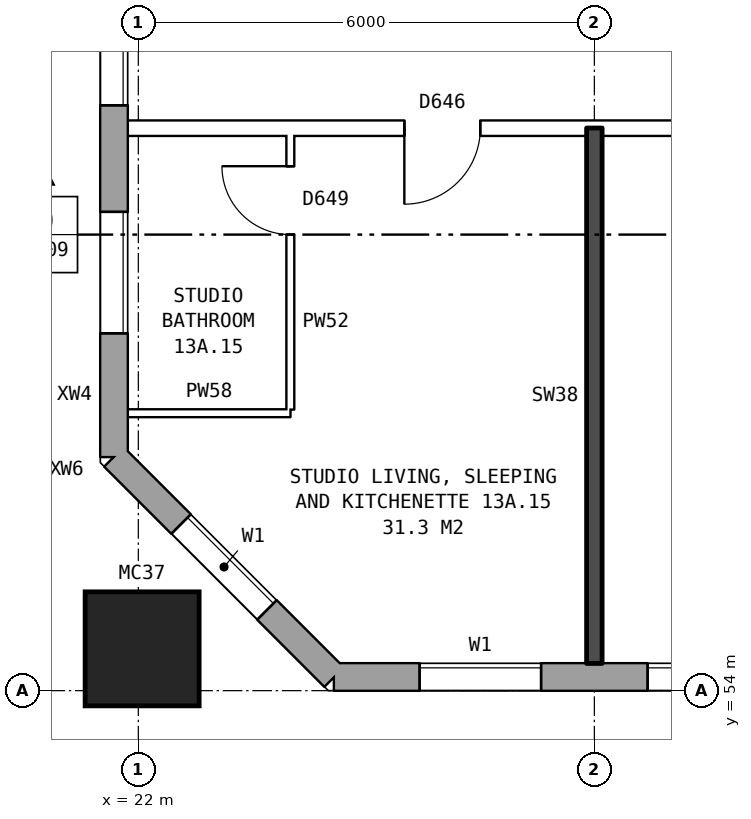
"""IFC4 building model, lengths in metres.
Left out: names, types, materials, properties, quantities, classifications, styles, units other than length and angle.
Written with IfcOpenShell. Run it as: python <this file> out.ifc"""

import sys

from ifc_helpers import new_model, si_unit, direction, frame, frame_2d, origin, origin_2d, place, context, subcontext, project, spatial, rectangle, hollow_rectangle, extrude, element, fill, save


model = new_model("IFC4")
c1 = context("Model", 3, precision=1e-05, world=origin(), true_north=direction((0.0, 1.0)))
c2 = subcontext(c1, "Body", "Model", "MODEL_VIEW")
j1 = project(units=[si_unit("LENGTHUNIT", "METRE"), si_unit("PLANEANGLEUNIT", "RADIAN")], contexts=[c1])
p1 = place(None, origin())
s1 = spatial("IfcSite", under=j1, at=p1, CompositionType="ELEMENT")
p2 = place(p1, origin())
s2 = spatial("IfcBuilding", under=s1, at=p2, CompositionType="ELEMENT")
p3 = place(p2, frame((0.0, 0.0, 50.5)))
s3 = spatial("IfcBuildingStorey", under=s2, at=p3, CompositionType="ELEMENT", Elevation=50.5)
p4 = place(p3, frame((22.05, 54.55, 0.0), z_axis=(0.0, 0.0, 1.0), x_axis=(1.0, 0.0, 0.0)))
e1 = element("IfcColumn", 1, at=p4, inside=s3, PredefinedType="COLUMN", context=c2, shape_type="SweptSolid", body=[
    extrude(hollow_rectangle(XDim=1.5, YDim=1.5, WallThickness=0.08, at=origin_2d()), origin(), (0.0, 0.0, 1.0), 3.1),
])
p5 = place(p3, frame((21.68, 57.075, 0.0), z_axis=(0.0, 0.0, 1.0), x_axis=(0.707106781187, -0.707106781187, 0.0)))
e2 = element("IfcWall", 2, at=p5, inside=s3, PredefinedType="STANDARD", context=c2, shape_type="SweptSolid", body=[
    extrude(rectangle(XDim=4.094, YDim=0.36, at=frame_2d((2.047, 0.0))), origin(), (0.0, 0.0, 1.0), 2.85),
])
p6 = place(p5, frame((1.247, 0.0, 0.8)))
e3 = element("IfcOpeningElement", 3, at=p6, cuts=e2, PredefinedType="OPENING", context=c2, shape_type="SweptSolid", body=[
    extrude(rectangle(XDim=1.6, YDim=1.8, at=frame_2d((0.8, 0.9))), frame((0.0, 0.19, 0.0), z_axis=(0.0, -1.0, 0.0), x_axis=(1.0, 0.0, 0.0)), (0.0, 0.0, 1.0), 0.38),
])
p7 = place(p3, frame((24.575, 54.18, 0.0), z_axis=(0.0, 0.0, 1.0), x_axis=(1.0, 0.0, 0.0)))
e4 = element("IfcWall", 4, at=p7, inside=s3, PredefinedType="STANDARD", context=c2, shape_type="SweptSolid", body=[
    extrude(rectangle(XDim=48.351, YDim=0.36, at=frame_2d((24.175, 0.0))), origin(), (0.0, 0.0, 1.0), 2.85),
])
p8 = place(p7, frame((1.125, 0.0, 0.8)))
e5 = element("IfcOpeningElement", 5, at=p8, cuts=e4, PredefinedType="OPENING", context=c2, shape_type="SweptSolid", body=[
    extrude(rectangle(XDim=1.6, YDim=1.8, at=frame_2d((0.8, 0.9))), frame((0.0, 0.19, 0.0), z_axis=(0.0, -1.0, 0.0), x_axis=(1.0, 0.0, 0.0)), (0.0, 0.0, 1.0), 0.38),
])
p9 = place(p7, frame((4.125, 0.0, 0.8)))
e6 = element("IfcOpeningElement", 6, at=p9, cuts=e4, PredefinedType="OPENING", context=c2, shape_type="SweptSolid", body=[
    extrude(rectangle(XDim=1.6, YDim=1.8, at=frame_2d((0.8, 0.9))), frame((0.0, 0.19, 0.0), z_axis=(0.0, -1.0, 0.0), x_axis=(1.0, 0.0, 0.0)), (0.0, 0.0, 1.0), 0.38),
])
p10 = place(p7, frame((6.025, 0.0, 0.8)))
e7 = element("IfcOpeningElement", 7, at=p10, cuts=e4, PredefinedType="OPENING", context=c2, shape_type="SweptSolid", body=[
    extrude(rectangle(XDim=1.0, YDim=1.8, at=frame_2d((0.5, 0.9))), frame((0.0, 0.19, 0.0), z_axis=(0.0, -1.0, 0.0), x_axis=(1.0, 0.0, 0.0)), (0.0, 0.0, 1.0), 0.38),
])
p11 = place(p7, frame((9.775, 0.0, 0.8)))
e8 = element("IfcOpeningElement", 8, at=p11, cuts=e4, PredefinedType="OPENING", context=c2, shape_type="SweptSolid", body=[
    extrude(rectangle(XDim=1.0, YDim=0.9, at=frame_2d((0.5, 0.45))), frame((0.0, 0.19, 0.0), z_axis=(0.0, -1.0, 0.0), x_axis=(1.0, 0.0, 0.0)), (0.0, 0.0, 1.0), 0.38),
])
p12 = place(p7, frame((13.125, 0.0, 0.8)))
e9 = element("IfcOpeningElement", 9, at=p12, cuts=e4, PredefinedType="OPENING", context=c2, shape_type="SweptSolid", body=[
    extrude(rectangle(XDim=1.6, YDim=1.8, at=frame_2d((0.8, 0.9))), frame((0.0, 0.19, 0.0), z_axis=(0.0, -1.0, 0.0), x_axis=(1.0, 0.0, 0.0)), (0.0, 0.0, 1.0), 0.38),
])
p13 = place(p7, frame((16.125, 0.0, 0.8)))
e10 = element("IfcOpeningElement", 10, at=p13, cuts=e4, PredefinedType="OPENING", context=c2, shape_type="SweptSolid", body=[
    extrude(rectangle(XDim=1.6, YDim=1.8, at=frame_2d((0.8, 0.9))), frame((0.0, 0.19, 0.0), z_axis=(0.0, -1.0, 0.0), x_axis=(1.0, 0.0, 0.0)), (0.0, 0.0, 1.0), 0.38),
])
p14 = place(p7, frame((19.125, 0.0, 0.8)))
e11 = element("IfcOpeningElement", 11, at=p14, cuts=e4, PredefinedType="OPENING", context=c2, shape_type="SweptSolid", body=[
    extrude(rectangle(XDim=1.6, YDim=1.8, at=frame_2d((0.8, 0.9))), frame((0.0, 0.19, 0.0), z_axis=(0.0, -1.0, 0.0), x_axis=(1.0, 0.0, 0.0)), (0.0, 0.0, 1.0), 0.38),
])
p15 = place(p7, frame((22.125, 0.0, 0.8)))
e12 = element("IfcOpeningElement", 12, at=p15, cuts=e4, PredefinedType="OPENING", context=c2, shape_type="SweptSolid", body=[
    extrude(rectangle(XDim=1.6, YDim=1.8, at=frame_2d((0.8, 0.9))), frame((0.0, 0.19, 0.0), z_axis=(0.0, -1.0, 0.0), x_axis=(1.0, 0.0, 0.0)), (0.0, 0.0, 1.0), 0.38),
])
p16 = place(p7, frame((25.125, 0.0, 0.8)))
e13 = element("IfcOpeningElement", 13, at=p16, cuts=e4, PredefinedType="OPENING", context=c2, shape_type="SweptSolid", body=[
    extrude(rectangle(XDim=1.6, YDim=1.8, at=frame_2d((0.8, 0.9))), frame((0.0, 0.19, 0.0), z_axis=(0.0, -1.0, 0.0), x_axis=(1.0, 0.0, 0.0)), (0.0, 0.0, 1.0), 0.38),
])
p17 = place(p7, frame((28.125, 0.0, 0.8)))
e14 = element("IfcOpeningElement", 14, at=p17, cuts=e4, PredefinedType="OPENING", context=c2, shape_type="SweptSolid", body=[
    extrude(rectangle(XDim=1.6, YDim=1.8, at=frame_2d((0.8, 0.9))), frame((0.0, 0.19, 0.0), z_axis=(0.0, -1.0, 0.0), x_axis=(1.0, 0.0, 0.0)), (0.0, 0.0, 1.0), 0.38),
])
p18 = place(p7, frame((31.125, 0.0, 0.8)))
e15 = element("IfcOpeningElement", 15, at=p18, cuts=e4, PredefinedType="OPENING", context=c2, shape_type="SweptSolid", body=[
    extrude(rectangle(XDim=1.6, YDim=1.8, at=frame_2d((0.8, 0.9))), frame((0.0, 0.19, 0.0), z_axis=(0.0, -1.0, 0.0), x_axis=(1.0, 0.0, 0.0)), (0.0, 0.0, 1.0), 0.38),
])
p19 = place(p7, frame((34.125, 0.0, 0.8)))
e16 = element("IfcOpeningElement", 16, at=p19, cuts=e4, PredefinedType="OPENING", context=c2, shape_type="SweptSolid", body=[
    extrude(rectangle(XDim=1.6, YDim=1.8, at=frame_2d((0.8, 0.9))), frame((0.0, 0.19, 0.0), z_axis=(0.0, -1.0, 0.0), x_axis=(1.0, 0.0, 0.0)), (0.0, 0.0, 1.0), 0.38),
])
p20 = place(p7, frame((36.575, 0.0, 0.45)))
e17 = element("IfcOpeningElement", 17, at=p20, cuts=e4, PredefinedType="OPENING", context=c2, shape_type="SweptSolid", body=[
    extrude(rectangle(XDim=1.2, YDim=1.8, at=frame_2d((0.6, 0.9))), frame((0.0, 0.19, 0.0), z_axis=(0.0, -1.0, 0.0), x_axis=(1.0, 0.0, 0.0)), (0.0, 0.0, 1.0), 0.38),
])
p21 = place(p7, frame((39.975, 0.0, 1.7)))
e18 = element("IfcOpeningElement", 18, at=p21, cuts=e4, PredefinedType="OPENING", context=c2, shape_type="SweptSolid", body=[
    extrude(rectangle(XDim=1.0, YDim=0.9, at=frame_2d((0.5, 0.45))), frame((0.0, 0.19, 0.0), z_axis=(0.0, -1.0, 0.0), x_axis=(1.0, 0.0, 0.0)), (0.0, 0.0, 1.0), 0.38),
])
p22 = place(p7, frame((43.125, 0.0, 0.8)))
e19 = element("IfcOpeningElement", 19, at=p22, cuts=e4, PredefinedType="OPENING", context=c2, shape_type="SweptSolid", body=[
    extrude(rectangle(XDim=1.6, YDim=1.8, at=frame_2d((0.8, 0.9))), frame((0.0, 0.19, 0.0), z_axis=(0.0, -1.0, 0.0), x_axis=(1.0, 0.0, 0.0)), (0.0, 0.0, 1.0), 0.38),
])
p23 = place(p7, frame((46.125, 0.0, 0.8)))
e20 = element("IfcOpeningElement", 20, at=p23, cuts=e4, PredefinedType="OPENING", context=c2, shape_type="SweptSolid", body=[
    extrude(rectangle(XDim=1.6, YDim=1.8, at=frame_2d((0.8, 0.9))), frame((0.0, 0.19, 0.0), z_axis=(0.0, -1.0, 0.0), x_axis=(1.0, 0.0, 0.0)), (0.0, 0.0, 1.0), 0.38),
])
p24 = place(p7, frame((7.325, 0.0, 1.7)))
e21 = element("IfcOpeningElement", 21, at=p24, cuts=e4, PredefinedType="OPENING", context=c2, shape_type="SweptSolid", body=[
    extrude(rectangle(XDim=1.0, YDim=0.9, at=frame_2d((0.5, 0.45))), frame((0.0, 0.19, 0.0), z_axis=(0.0, -1.0, 0.0), x_axis=(1.0, 0.0, 0.0)), (0.0, 0.0, 1.0), 0.38),
])
p25 = place(p7, frame((11.075, 0.0, 0.8)))
e22 = element("IfcOpeningElement", 22, at=p25, cuts=e4, PredefinedType="OPENING", context=c2, shape_type="SweptSolid", body=[
    extrude(rectangle(XDim=1.0, YDim=1.8, at=frame_2d((0.5, 0.9))), frame((0.0, 0.19, 0.0), z_axis=(0.0, -1.0, 0.0), x_axis=(1.0, 0.0, 0.0)), (0.0, 0.0, 1.0), 0.38),
])
p26 = place(p7, frame((38.075, 0.0, 0.45)))
e23 = element("IfcOpeningElement", 23, at=p26, cuts=e4, PredefinedType="OPENING", context=c2, shape_type="SweptSolid", body=[
    extrude(rectangle(XDim=1.0, YDim=0.9, at=frame_2d((0.5, 0.45))), frame((0.0, 0.19, 0.0), z_axis=(0.0, -1.0, 0.0), x_axis=(1.0, 0.0, 0.0)), (0.0, 0.0, 1.0), 0.38),
])
p27 = place(p7, frame((41.275, 0.0, 0.8)))
e24 = element("IfcOpeningElement", 24, at=p27, cuts=e4, PredefinedType="OPENING", context=c2, shape_type="SweptSolid", body=[
    extrude(rectangle(XDim=1.4, YDim=1.8, at=frame_2d((0.7, 0.9))), frame((0.0, 0.19, 0.0), z_axis=(0.0, -1.0, 0.0), x_axis=(1.0, 0.0, 0.0)), (0.0, 0.0, 1.0), 0.38),
])
p28 = place(p3, frame((21.68, 82.925, 0.0), z_axis=(0.0, 0.0, 1.0), x_axis=(0.0, -1.0, 0.0)))
e25 = element("IfcWall", 25, at=p28, inside=s3, PredefinedType="STANDARD", context=c2, shape_type="SweptSolid", body=[
    extrude(rectangle(XDim=25.851, YDim=0.36, at=frame_2d((12.925, 0.0))), origin(), (0.0, 0.0, 1.0), 2.85),
])
p29 = place(p28, frame((1.625, 0.0, 0.8)))
e26 = element("IfcOpeningElement", 26, at=p29, cuts=e25, PredefinedType="OPENING", context=c2, shape_type="SweptSolid", body=[
    extrude(rectangle(XDim=1.6, YDim=1.8, at=frame_2d((0.8, 0.9))), frame((0.0, 0.19, 0.0), z_axis=(0.0, -1.0, 0.0), x_axis=(1.0, 0.0, 0.0)), (0.0, 0.0, 1.0), 0.38),
])
p30 = place(p28, frame((4.625, 0.0, 0.8)))
e27 = element("IfcOpeningElement", 27, at=p30, cuts=e25, PredefinedType="OPENING", context=c2, shape_type="SweptSolid", body=[
    extrude(rectangle(XDim=1.6, YDim=1.8, at=frame_2d((0.8, 0.9))), frame((0.0, 0.19, 0.0), z_axis=(0.0, -1.0, 0.0), x_axis=(1.0, 0.0, 0.0)), (0.0, 0.0, 1.0), 0.38),
])
p31 = place(p28, frame((6.525, 0.0, 0.8)))
e28 = element("IfcOpeningElement", 28, at=p31, cuts=e25, PredefinedType="OPENING", context=c2, shape_type="SweptSolid", body=[
    extrude(rectangle(XDim=1.6, YDim=1.8, at=frame_2d((0.8, 0.9))), frame((0.0, 0.19, 0.0), z_axis=(0.0, -1.0, 0.0), x_axis=(1.0, 0.0, 0.0)), (0.0, 0.0, 1.0), 0.38),
])
p32 = place(p28, frame((8.425, 0.0, 1.1)))
e29 = element("IfcOpeningElement", 29, at=p32, cuts=e25, PredefinedType="OPENING", context=c2, shape_type="SweptSolid", body=[
    extrude(rectangle(XDim=0.8, YDim=1.5, at=frame_2d((0.4, 0.75))), frame((0.0, 0.19, 0.0), z_axis=(0.0, -1.0, 0.0), x_axis=(1.0, 0.0, 0.0)), (0.0, 0.0, 1.0), 0.38),
])
p33 = place(p28, frame((9.525, 0.0, 1.6)))
e30 = element("IfcOpeningElement", 30, at=p33, cuts=e25, PredefinedType="OPENING", context=c2, shape_type="SweptSolid", body=[
    extrude(rectangle(XDim=0.6, YDim=0.9, at=frame_2d((0.3, 0.45))), frame((0.0, 0.19, 0.0), z_axis=(0.0, -1.0, 0.0), x_axis=(1.0, 0.0, 0.0)), (0.0, 0.0, 1.0), 0.38),
])
p34 = place(p28, frame((11.475, 0.0, 0.8)))
e31 = element("IfcOpeningElement", 31, at=p34, cuts=e25, PredefinedType="OPENING", context=c2, shape_type="SweptSolid", body=[
    extrude(rectangle(XDim=0.6, YDim=0.9, at=frame_2d((0.3, 0.45))), frame((0.0, 0.19, 0.0), z_axis=(0.0, -1.0, 0.0), x_axis=(1.0, 0.0, 0.0)), (0.0, 0.0, 1.0), 0.38),
])
p35 = place(p28, frame((19.625, 0.0, 0.8)))
e32 = element("IfcOpeningElement", 32, at=p35, cuts=e25, PredefinedType="OPENING", context=c2, shape_type="SweptSolid", body=[
    extrude(rectangle(XDim=1.6, YDim=1.8, at=frame_2d((0.8, 0.9))), frame((0.0, 0.19, 0.0), z_axis=(0.0, -1.0, 0.0), x_axis=(1.0, 0.0, 0.0)), (0.0, 0.0, 1.0), 0.38),
])
p36 = place(p28, frame((22.625, 0.0, 0.8)))
e33 = element("IfcOpeningElement", 33, at=p36, cuts=e25, PredefinedType="OPENING", context=c2, shape_type="SweptSolid", body=[
    extrude(rectangle(XDim=1.6, YDim=1.8, at=frame_2d((0.8, 0.9))), frame((0.0, 0.19, 0.0), z_axis=(0.0, -1.0, 0.0), x_axis=(1.0, 0.0, 0.0)), (0.0, 0.0, 1.0), 0.38),
])
p37 = place(p28, frame((12.375, 0.0, 0.8)))
e34 = element("IfcOpeningElement", 34, at=p37, cuts=e25, PredefinedType="OPENING", context=c2, shape_type="SweptSolid", body=[
    extrude(rectangle(XDim=1.0, YDim=1.8, at=frame_2d((0.5, 0.9))), frame((0.0, 0.19, 0.0), z_axis=(0.0, -1.0, 0.0), x_axis=(1.0, 0.0, 0.0)), (0.0, 0.0, 1.0), 0.38),
])
p38 = place(p28, frame((13.675, 0.0, 0.8)))
e35 = element("IfcOpeningElement", 35, at=p38, cuts=e25, PredefinedType="OPENING", context=c2, shape_type="SweptSolid", body=[
    extrude(rectangle(XDim=0.6, YDim=0.9, at=frame_2d((0.3, 0.45))), frame((0.0, 0.19, 0.0), z_axis=(0.0, -1.0, 0.0), x_axis=(1.0, 0.0, 0.0)), (0.0, 0.0, 1.0), 0.38),
])
p39 = place(p28, frame((15.575, 0.0, 1.7)))
e36 = element("IfcOpeningElement", 36, at=p39, cuts=e25, PredefinedType="OPENING", context=c2, shape_type="SweptSolid", body=[
    extrude(rectangle(XDim=0.6, YDim=0.9, at=frame_2d((0.3, 0.45))), frame((0.0, 0.19, 0.0), z_axis=(0.0, -1.0, 0.0), x_axis=(1.0, 0.0, 0.0)), (0.0, 0.0, 1.0), 0.38),
])
p40 = place(p28, frame((16.575, 0.0, 1.1)))
e37 = element("IfcOpeningElement", 37, at=p40, cuts=e25, PredefinedType="OPENING", context=c2, shape_type="SweptSolid", body=[
    extrude(rectangle(XDim=0.8, YDim=1.5, at=frame_2d((0.4, 0.75))), frame((0.0, 0.19, 0.0), z_axis=(0.0, -1.0, 0.0), x_axis=(1.0, 0.0, 0.0)), (0.0, 0.0, 1.0), 0.38),
])
p41 = place(p28, frame((17.675, 0.0, 0.8)))
e38 = element("IfcOpeningElement", 38, at=p41, cuts=e25, PredefinedType="OPENING", context=c2, shape_type="SweptSolid", body=[
    extrude(rectangle(XDim=1.6, YDim=1.8, at=frame_2d((0.8, 0.9))), frame((0.0, 0.19, 0.0), z_axis=(0.0, -1.0, 0.0), x_axis=(1.0, 0.0, 0.0)), (0.0, 0.0, 1.0), 0.38),
])
p42 = place(p3, frame((21.86, 57.65, 0.0), z_axis=(0.0, 0.0, 1.0), x_axis=(1.0, 0.0, 0.0)))
e39 = element("IfcWall", 39, at=p42, inside=s3, PredefinedType="PARTITIONING", context=c2, shape_type="SweptSolid", body=[
    extrude(rectangle(XDim=2.14, YDim=0.1, at=frame_2d((1.07, 0.0))), origin(), (0.0, 0.0, 1.0), 2.85),
])
p43 = place(p3, frame((21.86, 61.4, 0.0), z_axis=(0.0, 0.0, 1.0), x_axis=(1.0, 0.0, 0.0)))
e40 = element("IfcWall", 40, at=p43, inside=s3, PredefinedType="PARTITIONING", context=c2, shape_type="SweptSolid", body=[
    extrude(rectangle(XDim=24.04, YDim=0.2, at=frame_2d((12.02, 0.0))), origin(), (0.0, 0.0, 1.0), 2.85),
])
p44 = place(p43, frame((20.59, 0.0, 0.0)))
e41 = element("IfcOpeningElement", 41, at=p44, cuts=e40, PredefinedType="OPENING", context=c2, shape_type="SweptSolid", body=[
    extrude(rectangle(XDim=1.0, YDim=2.1, at=frame_2d((0.5, 1.05))), frame((0.0, 0.11, 0.0), z_axis=(0.0, -1.0, 0.0), x_axis=(1.0, 0.0, 0.0)), (0.0, 0.0, 1.0), 0.22),
])
p45 = place(p43, frame((8.64, 0.0, 0.0)))
e42 = element("IfcOpeningElement", 42, at=p45, cuts=e40, PredefinedType="OPENING", context=c2, shape_type="SweptSolid", body=[
    extrude(rectangle(XDim=1.0, YDim=2.1, at=frame_2d((0.5, 1.05))), frame((0.0, 0.11, 0.0), z_axis=(0.0, -1.0, 0.0), x_axis=(1.0, 0.0, 0.0)), (0.0, 0.0, 1.0), 0.22),
])
p46 = place(p43, frame((3.64, 0.0, 0.0)))
e43 = element("IfcOpeningElement", 43, at=p46, cuts=e40, PredefinedType="OPENING", context=c2, shape_type="SweptSolid", body=[
    extrude(rectangle(XDim=1.0, YDim=2.1, at=frame_2d((0.5, 1.05))), frame((0.0, 0.11, 0.0), z_axis=(0.0, -1.0, 0.0), x_axis=(1.0, 0.0, 0.0)), (0.0, 0.0, 1.0), 0.22),
])
p47 = place(p3, frame((24.0, 57.7, 0.0), z_axis=(0.0, 0.0, 1.0), x_axis=(0.0, 1.0, 0.0)))
e44 = element("IfcWall", 44, at=p47, inside=s3, PredefinedType="PARTITIONING", context=c2, shape_type="SweptSolid", body=[
    extrude(rectangle(XDim=3.6, YDim=0.1, at=frame_2d((1.8, 0.0))), origin(), (0.0, 0.0, 1.0), 2.85),
])
p48 = place(p47, frame((2.3, 0.0, 0.0)))
e45 = element("IfcOpeningElement", 45, at=p48, cuts=e44, PredefinedType="OPENING", context=c2, shape_type="SweptSolid", body=[
    extrude(rectangle(XDim=0.9, YDim=2.1, at=frame_2d((0.45, 1.05))), frame((0.0, 0.06, 0.0), z_axis=(0.0, -1.0, 0.0), x_axis=(1.0, 0.0, 0.0)), (0.0, 0.0, 1.0), 0.12),
])
p49 = place(p3, frame((28.0, 54.36, 0.0), z_axis=(0.0, 0.0, 1.0), x_axis=(0.0, 1.0, 0.0)))
e46 = element("IfcWall", 46, at=p49, inside=s3, PredefinedType="SOLIDWALL", context=c2, shape_type="SweptSolid", body=[
    extrude(rectangle(XDim=7.04, YDim=0.2, at=frame_2d((3.52, 0.0))), origin(), (0.0, 0.0, 1.0), 2.85),
])
p50 = place(p6, origin())
e47 = element("IfcWindow", 47, at=p50, inside=s3, PartitioningType="SINGLE_PANEL", PredefinedType="WINDOW", context=c2, shape_type="SweptSolid", body=[
    extrude(rectangle(XDim=1.6, YDim=1.8, at=frame_2d((0.8, 0.9))), frame((0.0, 0.15, 0.0), z_axis=(0.0, -1.0, 0.0), x_axis=(1.0, 0.0, 0.0)), (0.0, 0.0, 1.0), 0.06),
])
fill(e3, e47)
p51 = place(p8, origin())
e48 = element("IfcWindow", 48, at=p51, inside=s3, PartitioningType="SINGLE_PANEL", PredefinedType="WINDOW", context=c2, shape_type="SweptSolid", body=[
    extrude(rectangle(XDim=1.6, YDim=1.8, at=frame_2d((0.8, 0.9))), frame((0.0, 0.15, 0.0), z_axis=(0.0, -1.0, 0.0), x_axis=(1.0, 0.0, 0.0)), (0.0, 0.0, 1.0), 0.06),
])
fill(e5, e48)
p52 = place(p9, origin())
e49 = element("IfcWindow", 49, at=p52, inside=s3, PartitioningType="SINGLE_PANEL", PredefinedType="WINDOW", context=c2, shape_type="SweptSolid", body=[
    extrude(rectangle(XDim=1.6, YDim=1.8, at=frame_2d((0.8, 0.9))), frame((0.0, 0.15, 0.0), z_axis=(0.0, -1.0, 0.0), x_axis=(1.0, 0.0, 0.0)), (0.0, 0.0, 1.0), 0.06),
])
fill(e6, e49)
p53 = place(p35, origin())
e50 = element("IfcWindow", 50, at=p53, inside=s3, PartitioningType="SINGLE_PANEL", PredefinedType="WINDOW", context=c2, shape_type="SweptSolid", body=[
    extrude(rectangle(XDim=1.6, YDim=1.8, at=frame_2d((0.8, 0.9))), frame((0.0, 0.15, 0.0), z_axis=(0.0, -1.0, 0.0), x_axis=(1.0, 0.0, 0.0)), (0.0, 0.0, 1.0), 0.06),
])
fill(e32, e50)
p54 = place(p36, origin())
e51 = element("IfcWindow", 51, at=p54, inside=s3, PartitioningType="SINGLE_PANEL", PredefinedType="WINDOW", context=c2, shape_type="SweptSolid", body=[
    extrude(rectangle(XDim=1.6, YDim=1.8, at=frame_2d((0.8, 0.9))), frame((0.0, 0.15, 0.0), z_axis=(0.0, -1.0, 0.0), x_axis=(1.0, 0.0, 0.0)), (0.0, 0.0, 1.0), 0.06),
])
fill(e33, e51)
p55 = place(p46, frame((1.0, 0.0, 0.0), z_axis=(0.0, 0.0, 1.0), x_axis=(-1.0, 0.0, 0.0)))
e52 = element("IfcDoor", 52, at=p55, inside=s3, OperationType="SINGLE_SWING_RIGHT", PredefinedType="DOOR", context=c2, shape_type="SweptSolid", body=[
    extrude(rectangle(XDim=1.0, YDim=2.1, at=frame_2d((0.5, 1.05))), frame((0.0, 0.025, 0.0), z_axis=(0.0, -1.0, 0.0), x_axis=(1.0, 0.0, 0.0)), (0.0, 0.0, 1.0), 0.05),
])
fill(e43, e52)
p56 = place(p48, origin())
e53 = element("IfcDoor", 53, at=p56, inside=s3, OperationType="SINGLE_SWING_RIGHT", PredefinedType="DOOR", context=c2, shape_type="SweptSolid", body=[
    extrude(rectangle(XDim=0.9, YDim=2.1, at=frame_2d((0.45, 1.05))), frame((0.0, 0.025, 0.0), z_axis=(0.0, -1.0, 0.0), x_axis=(1.0, 0.0, 0.0)), (0.0, 0.0, 1.0), 0.05),
])
fill(e45, e53)
save(model, sys.argv[1])
